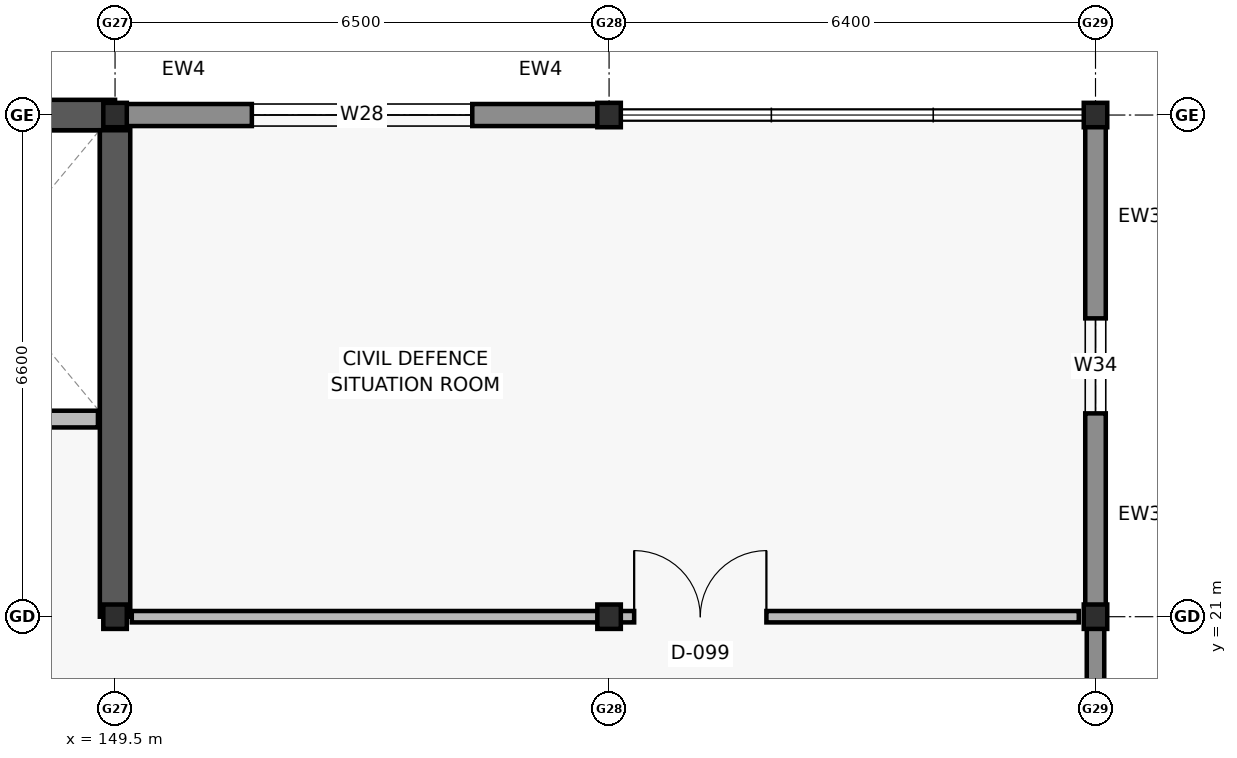
"""IFC4 building model, lengths in metres.
Left out: names, types, materials, properties, quantities, classifications, styles, units other than length and angle.
Written with IfcOpenShell. Run it as: python <this file> out.ifc"""

import sys

from ifc_helpers import new_model, si_unit, direction, frame, frame_2d, origin, origin_2d, place, context, subcontext, project, spatial, rectangle, i_section, extrude, element, fill, save


model = new_model("IFC4")
c1 = context("Model", 3, precision=1e-05, world=origin(), true_north=direction((0.0, 1.0)))
c2 = subcontext(c1, "Body", "Model", "MODEL_VIEW")
j1 = project(units=[si_unit("LENGTHUNIT", "METRE"), si_unit("PLANEANGLEUNIT", "RADIAN")], contexts=[c1])
p1 = place(None, origin())
s1 = spatial("IfcSite", under=j1, at=p1, CompositionType="ELEMENT")
p2 = place(p1, origin())
s2 = spatial("IfcBuilding", under=s1, at=p2, CompositionType="ELEMENT")
p3 = place(p2, frame((0.0, 0.0, 9.6)))
s3 = spatial("IfcBuildingStorey", under=s2, at=p3, CompositionType="ELEMENT", Elevation=9.6)
for number, where, z_axis, x_axis in (
    (1, (149.5, 21.0, 0.0), (0.0, 0.0, 1.0), (1.0, 0.0, 0.0)),
    (2, (149.5, 27.6, 0.0), (0.0, 0.0, 1.0), (1.0, 0.0, 0.0)),
    (3, (156.0, 21.0, 0.0), (0.0, 0.0, 1.0), (1.0, 0.0, 0.0)),
    (4, (156.0, 27.6, 0.0), (0.0, 0.0, 1.0), (1.0, 0.0, 0.0)),
    (5, (162.4, 21.0, 0.0), (0.0, 0.0, 1.0), (1.0, 0.0, 0.0)),
    (6, (162.4, 27.6, 0.0), (0.0, 0.0, 1.0), (1.0, 0.0, 0.0)),
):
    element("IfcColumn", number, at=place(p3, frame(where, z_axis=z_axis, x_axis=x_axis)), inside=s3, PredefinedType="COLUMN", context=c2, shape_type="SweptSolid", body=[
        extrude(i_section(OverallWidth=0.309, OverallDepth=0.321, WebThickness=0.014, FlangeThickness=0.022, FilletRadius=0.017, at=origin_2d()), origin(), (0.0, 0.0, 1.0), 3.9),
    ])
p4 = place(p3, frame((143.0, 27.6, 0.0), z_axis=(0.0, 0.0, 1.0), x_axis=(1.0, 0.0, 0.0)))
e7 = element("IfcWall", 7, at=p4, inside=s3, PredefinedType="SHEAR", context=c2, shape_type="SweptSolid", body=[
    extrude(rectangle(XDim=6.5, YDim=0.4, at=frame_2d((3.25, 0.0))), origin(), (0.0, 0.0, 1.0), 3.66),
])
p5 = place(p3, frame((149.5, 21.0, 0.0), z_axis=(0.0, 0.0, 1.0), x_axis=(0.0, 1.0, 0.0)))
e8 = element("IfcWall", 8, at=p5, inside=s3, PredefinedType="SHEAR", context=c2, shape_type="SweptSolid", body=[
    extrude(rectangle(XDim=6.4, YDim=0.4, at=frame_2d((3.2, 0.0))), origin(), (0.0, 0.0, 1.0), 3.66),
])
p6 = place(p3, frame((149.505, 27.6, 0.0), z_axis=(0.0, 0.0, 1.0), x_axis=(1.0, 0.0, 0.0)))
e9 = element("IfcWall", 9, at=p6, inside=s3, PredefinedType="SOLIDWALL", context=c2, shape_type="SweptSolid", body=[
    extrude(rectangle(XDim=6.49, YDim=0.29, at=frame_2d((3.245, 0.0))), origin(), (0.0, 0.0, 1.0), 3.02),
])
p7 = place(p6, frame((1.795, 0.0, 0.8)))
e10 = element("IfcOpeningElement", 10, at=p7, cuts=e9, PredefinedType="OPENING", context=c2, shape_type="SweptSolid", body=[
    extrude(rectangle(XDim=2.9, YDim=1.15, at=frame_2d((1.45, 0.575))), frame((0.0, 0.155, 0.0), z_axis=(0.0, -1.0, 0.0), x_axis=(1.0, 0.0, 0.0)), (0.0, 0.0, 1.0), 0.31),
])
p8 = place(p3, frame((162.4, 20.995, 0.0), z_axis=(0.0, 0.0, 1.0), x_axis=(0.0, -1.0, 0.0)))
e11 = element("IfcWall", 11, at=p8, inside=s3, PredefinedType="SOLIDWALL", context=c2, shape_type="SweptSolid", body=[
    extrude(rectangle(XDim=6.59, YDim=0.23, at=frame_2d((3.295, 0.0))), origin(), (0.0, 0.0, 1.0), 3.02),
])
p9 = place(p8, frame((3.827, 0.0, 0.8)))
e12 = element("IfcOpeningElement", 12, at=p9, cuts=e11, PredefinedType="OPENING", context=c2, shape_type="SweptSolid", body=[
    extrude(rectangle(XDim=1.7, YDim=1.25, at=frame_2d((0.85, 0.625))), frame((0.0, 0.125, 0.0), z_axis=(0.0, -1.0, 0.0), x_axis=(1.0, 0.0, 0.0)), (0.0, 0.0, 1.0), 0.25),
])
p10 = place(p3, frame((162.4, 27.595, 0.0), z_axis=(0.0, 0.0, 1.0), x_axis=(0.0, -1.0, 0.0)))
e13 = element("IfcWall", 13, at=p10, inside=s3, PredefinedType="SOLIDWALL", context=c2, shape_type="SweptSolid", body=[
    extrude(rectangle(XDim=6.59, YDim=0.27, at=frame_2d((3.295, 0.0))), origin(), (0.0, 0.0, 1.0), 3.02),
])
p11 = place(p10, frame((2.67, 0.0, 0.8)))
e14 = element("IfcOpeningElement", 14, at=p11, cuts=e13, PredefinedType="OPENING", context=c2, shape_type="SweptSolid", body=[
    extrude(rectangle(XDim=1.25, YDim=1.5, at=frame_2d((0.625, 0.75))), frame((0.0, 0.145, 0.0), z_axis=(0.0, -1.0, 0.0), x_axis=(1.0, 0.0, 0.0)), (0.0, 0.0, 1.0), 0.29),
])
p12 = place(p3, frame((146.24, 23.6, 0.0), z_axis=(0.0, 0.0, 1.0), x_axis=(1.0, 0.0, 0.0)))
e15 = element("IfcWall", 15, at=p12, inside=s3, PredefinedType="SOLIDWALL", context=c2, shape_type="SweptSolid", body=[
    extrude(rectangle(XDim=3.035, YDim=0.22, at=frame_2d((1.518, 0.0))), origin(), (0.0, 0.0, 1.0), 3.66),
])
p13 = place(p12, frame((0.917, 0.0, 0.0)))
e16 = element("IfcOpeningElement", 16, at=p13, cuts=e15, PredefinedType="OPENING", context=c2, shape_type="SweptSolid", body=[
    extrude(rectangle(XDim=1.2, YDim=2.15, at=frame_2d((0.6, 1.075))), frame((0.0, 0.12, 0.0), z_axis=(0.0, -1.0, 0.0), x_axis=(1.0, 0.0, 0.0)), (0.0, 0.0, 1.0), 0.24),
])
p14 = place(p3, frame((149.72, 21.0, 0.0), z_axis=(0.0, 0.0, 1.0), x_axis=(1.0, 0.0, 0.0)))
e17 = element("IfcWall", 17, at=p14, inside=s3, PredefinedType="PARTITIONING", context=c2, shape_type="SweptSolid", body=[
    extrude(rectangle(XDim=12.46, YDim=0.15, at=frame_2d((6.23, 0.0))), origin(), (0.0, 0.0, 1.0), 3.0),
])
p15 = place(p14, frame((6.61, 0.0, 0.0)))
e18 = element("IfcOpeningElement", 18, at=p15, cuts=e17, PredefinedType="OPENING", context=c2, shape_type="SweptSolid", body=[
    extrude(rectangle(XDim=1.74, YDim=2.2, at=frame_2d((0.87, 1.1))), frame((0.0, 0.085, 0.0), z_axis=(0.0, -1.0, 0.0), x_axis=(1.0, 0.0, 0.0)), (0.0, 0.0, 1.0), 0.17),
])
p16 = place(p7, origin())
e19 = element("IfcWindow", 19, at=p16, inside=s3, PartitioningType="TRIPLE_PANEL_VERTICAL", PredefinedType="WINDOW", context=c2, shape_type="SweptSolid", body=[
    extrude(rectangle(XDim=2.9, YDim=1.15, at=frame_2d((1.45, 0.575))), frame((0.0, 0.03, 0.0), z_axis=(0.0, -1.0, 0.0), x_axis=(1.0, 0.0, 0.0)), (0.0, 0.0, 1.0), 0.06),
])
fill(e10, e19)
p17 = place(p11, origin())
e20 = element("IfcWindow", 20, at=p17, inside=s3, PartitioningType="SINGLE_PANEL", PredefinedType="WINDOW", context=c2, shape_type="SweptSolid", body=[
    extrude(rectangle(XDim=1.25, YDim=1.5, at=frame_2d((0.625, 0.75))), frame((0.0, 0.03, 0.0), z_axis=(0.0, -1.0, 0.0), x_axis=(1.0, 0.0, 0.0)), (0.0, 0.0, 1.0), 0.06),
])
fill(e14, e20)
p18 = place(p15, origin())
e21 = element("IfcDoor", 21, at=p18, inside=s3, OperationType="DOUBLE_DOOR_SINGLE_SWING", PredefinedType="DOOR", context=c2, shape_type="SweptSolid", body=[
    extrude(rectangle(XDim=1.74, YDim=2.2, at=frame_2d((0.87, 1.1))), frame((0.0, 0.025, 0.0), z_axis=(0.0, -1.0, 0.0), x_axis=(1.0, 0.0, 0.0)), (0.0, 0.0, 1.0), 0.05),
])
fill(e18, e21)
save(model, sys.argv[1])
